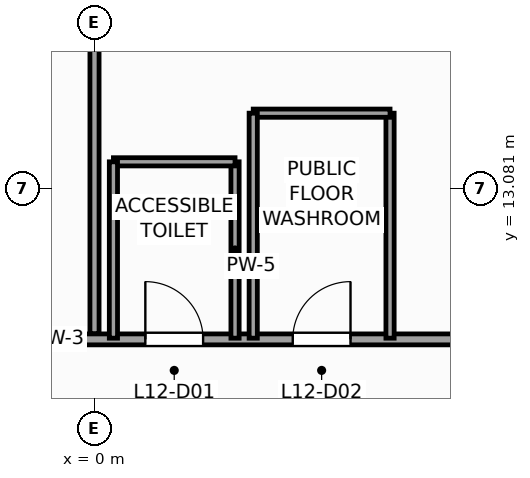
"""IFC4 building model, lengths in metres.
Left out: names, types, materials, properties, quantities, classifications, styles, units other than length and angle.
Written with IfcOpenShell. Run it as: python <this file> out.ifc"""

import sys

from ifc_helpers import new_model, si_unit, direction, frame, frame_2d, origin, place, context, subcontext, project, spatial, rectangle, extrude, source, transform, mapped, element, fill, save


model = new_model("IFC4")
c1 = context("Model", 3, precision=1e-05, world=origin(), true_north=direction((0.0, 1.0)))
c2 = subcontext(c1, "Body", "Model", "MODEL_VIEW")
j1 = project(units=[si_unit("LENGTHUNIT", "METRE"), si_unit("PLANEANGLEUNIT", "RADIAN")], contexts=[c1])
p1 = place(None, origin())
s1 = spatial("IfcSite", under=j1, at=p1, CompositionType="ELEMENT")
p2 = place(p1, origin())
s2 = spatial("IfcBuilding", under=s1, at=p2, CompositionType="ELEMENT")
p3 = place(p2, frame((0.0, 0.0, 54.0)))
s3 = spatial("IfcBuildingStorey", under=s2, at=p3, CompositionType="ELEMENT", Elevation=54.0)
p4 = place(p3, frame((-11.75, 10.6, 0.0), z_axis=(0.0, 0.0, 1.0), x_axis=(1.0, 0.0, 0.0)))
e1 = element("IfcWall", 1, at=p4, inside=s3, PredefinedType="PARTITIONING", context=c2, shape_type="SweptSolid", body=[
    extrude(rectangle(XDim=22.35, YDim=0.18, at=frame_2d((11.175, 0.0))), origin(), (0.0, 0.0, 1.0), 3.72),
])
p5 = place(p4, frame((12.586, 0.0, 0.0)))
e2 = element("IfcOpeningElement", 2, at=p5, cuts=e1, PredefinedType="OPENING", context=c2, shape_type="SweptSolid", body=[
    extrude(rectangle(XDim=0.95, YDim=2.1, at=frame_2d((0.475, 1.05))), frame((0.0, 0.1, 0.0), z_axis=(0.0, -1.0, 0.0), x_axis=(1.0, 0.0, 0.0)), (0.0, 0.0, 1.0), 0.2),
])
p6 = place(p4, frame((15.01, 0.0, 0.0)))
e3 = element("IfcOpeningElement", 3, at=p6, cuts=e1, PredefinedType="OPENING", context=c2, shape_type="SweptSolid", body=[
    extrude(rectangle(XDim=0.95, YDim=2.1, at=frame_2d((0.475, 1.05))), frame((0.0, 0.1, 0.0), z_axis=(0.0, -1.0, 0.0), x_axis=(1.0, 0.0, 0.0)), (0.0, 0.0, 1.0), 0.2),
])
p7 = place(p3, frame((0.0, 10.695, 0.0), z_axis=(0.0, 0.0, 1.0), x_axis=(0.0, 1.0, 0.0)))
e4 = element("IfcWall", 4, at=p7, inside=s3, PredefinedType="PARTITIONING", context=c2, shape_type="SweptSolid", body=[
    extrude(rectangle(XDim=17.99, YDim=0.15, at=frame_2d((8.995, 0.0))), origin(), (0.0, 0.0, 1.0), 3.72),
])
p8 = place(p3, frame((2.311, 10.62, 0.0), z_axis=(0.0, 0.0, 1.0), x_axis=(0.0, 1.0, 0.0)))
e5 = element("IfcWall", 5, at=p8, inside=s3, PredefinedType="PARTITIONING", context=c2, shape_type="SweptSolid", body=[
    extrude(rectangle(XDim=2.9, YDim=0.135, at=frame_2d((1.45, 0.0))), origin(), (0.0, 0.0, 1.0), 3.72),
])
p9 = place(p3, frame((0.311, 13.52, 0.0), z_axis=(0.0, 0.0, 1.0), x_axis=(1.0, 0.0, 0.0)))
e6 = element("IfcWall", 6, at=p9, inside=s3, PredefinedType="PARTITIONING", context=c2, shape_type="SweptSolid", body=[
    extrude(rectangle(XDim=2.0, YDim=0.135, at=frame_2d((1.0, 0.0))), origin(), (0.0, 0.0, 1.0), 3.72),
])
p10 = place(p3, frame((0.311, 10.62, 0.0), z_axis=(0.0, 0.0, 1.0), x_axis=(0.0, 1.0, 0.0)))
e7 = element("IfcWall", 7, at=p10, inside=s3, PredefinedType="PARTITIONING", context=c2, shape_type="SweptSolid", body=[
    extrude(rectangle(XDim=2.9, YDim=0.135, at=frame_2d((1.45, 0.0))), origin(), (0.0, 0.0, 1.0), 3.72),
])
p11 = place(p3, frame((4.86, 10.62, 0.0), z_axis=(0.0, 0.0, 1.0), x_axis=(0.0, 1.0, 0.0)))
e8 = element("IfcWall", 8, at=p11, inside=s3, PredefinedType="PARTITIONING", context=c2, shape_type="SweptSolid", body=[
    extrude(rectangle(XDim=3.7, YDim=0.135, at=frame_2d((1.85, 0.0))), origin(), (0.0, 0.0, 1.0), 3.72),
])
p12 = place(p3, frame((2.61, 14.32, 0.0), z_axis=(0.0, 0.0, 1.0), x_axis=(1.0, 0.0, 0.0)))
e9 = element("IfcWall", 9, at=p12, inside=s3, PredefinedType="PARTITIONING", context=c2, shape_type="SweptSolid", body=[
    extrude(rectangle(XDim=2.25, YDim=0.135, at=frame_2d((1.125, 0.0))), origin(), (0.0, 0.0, 1.0), 3.72),
])
p13 = place(p3, frame((2.61, 10.62, 0.0), z_axis=(0.0, 0.0, 1.0), x_axis=(0.0, 1.0, 0.0)))
e10 = element("IfcWall", 10, at=p13, inside=s3, PredefinedType="PARTITIONING", context=c2, shape_type="SweptSolid", body=[
    extrude(rectangle(XDim=3.7, YDim=0.135, at=frame_2d((1.85, 0.0))), origin(), (0.0, 0.0, 1.0), 3.72),
])
m1 = source(origin(), c2, "Body", "SweptSolid", [
    extrude(rectangle(XDim=0.95, YDim=2.1, at=frame_2d((0.475, 1.05))), frame((0.0, 0.025, 0.0), z_axis=(0.0, -1.0, 0.0), x_axis=(1.0, 0.0, 0.0)), (0.0, 0.0, 1.0), 0.05),
])
p14 = place(p5, origin())
e11 = element("IfcDoor", 11, at=p14, inside=s3, OperationType="SINGLE_SWING_LEFT", PredefinedType="DOOR", context=c2, shape_type="MappedRepresentation", body=[
    mapped(m1, transform((0.0, 0.0, 0.0), scale=1.0)),
])
fill(e2, e11)
p15 = place(p6, origin())
e12 = element("IfcDoor", 12, at=p15, inside=s3, OperationType="SINGLE_SWING_RIGHT", PredefinedType="DOOR", context=c2, shape_type="MappedRepresentation", body=[
    mapped(m1, transform((0.0, 0.0, 0.0), scale=1.0)),
])
fill(e3, e12)
save(model, sys.argv[1])
